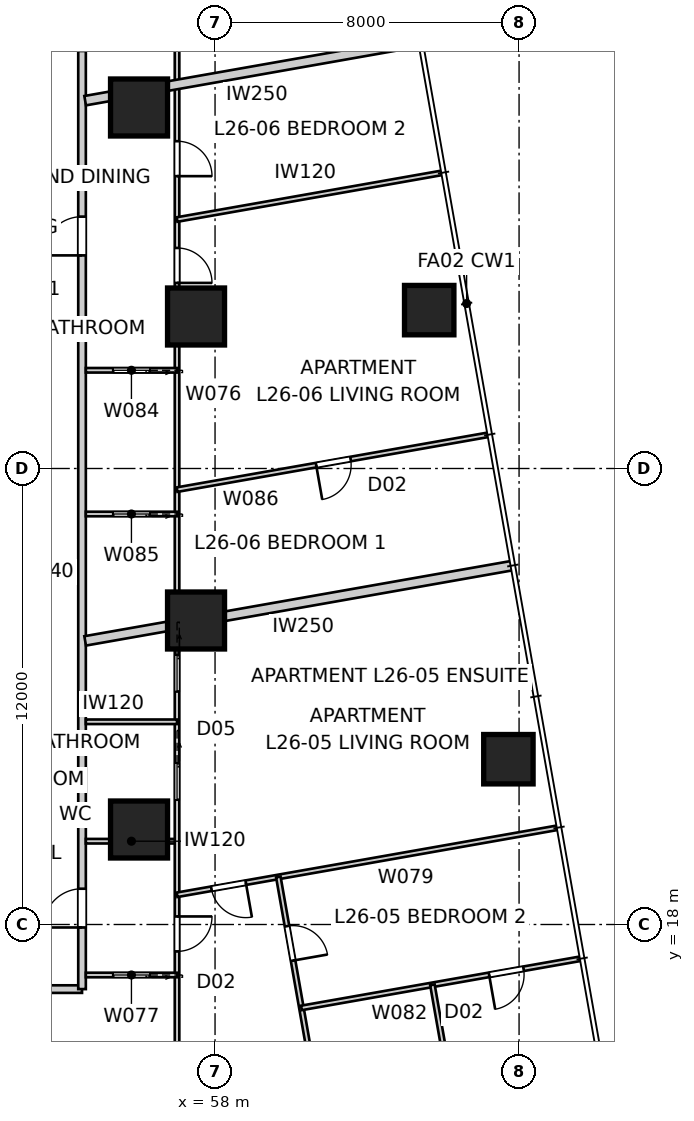
"""IFC4 building model, lengths in metres.
Left out: names, types, materials, properties, quantities, classifications, styles, units other than length and angle.
Written with IfcOpenShell. Run it as: python <this file> out.ifc"""

import sys

from ifc_helpers import new_model, si_unit, direction, frame, frame_2d, origin, origin_2d, place, context, subcontext, project, spatial, rectangle, extrude, element, fill, save


model = new_model("IFC4")
c1 = context("Model", 3, precision=1e-05, world=origin(), true_north=direction((0.0, 1.0)))
c2 = subcontext(c1, "Body", "Model", "MODEL_VIEW")
j1 = project(units=[si_unit("LENGTHUNIT", "METRE"), si_unit("PLANEANGLEUNIT", "RADIAN")], contexts=[c1])
p1 = place(None, origin())
s1 = spatial("IfcSite", under=j1, at=p1, CompositionType="ELEMENT")
p2 = place(p1, origin())
s2 = spatial("IfcBuilding", under=s1, at=p2, CompositionType="ELEMENT")
p3 = place(p2, frame((0.0, 0.0, 96.4)))
s3 = spatial("IfcBuildingStorey", under=s2, at=p3, CompositionType="ELEMENT", Elevation=96.4)
for number, where, z_axis, x_axis in (
    (1, (65.719, 22.35, 0.0), (0.0, 0.0, 1.0), (1.0, 0.0, 0.0)),
    (2, (63.635, 34.167, 0.0), (0.0, 0.0, 1.0), (1.0, 0.0, 0.0)),
):
    element("IfcColumn", number, at=place(p3, frame(where, z_axis=z_axis, x_axis=x_axis)), inside=s3, PredefinedType="COLUMN", context=c2, shape_type="SweptSolid", body=[
        extrude(rectangle(XDim=1.3, YDim=1.3, at=origin_2d()), origin(), (0.0, 0.0, 1.0), 3.4),
    ])
for number, where, z_axis, x_axis in (
    (3, (57.5, 26.0, 0.0), (0.0, 0.0, 1.0), (1.0, 0.0, 0.0)),
    (4, (57.5, 34.0, 0.0), (0.0, 0.0, 1.0), (1.0, 0.0, 0.0)),
    (5, (56.0, 39.5, 0.0), (0.0, 0.0, 1.0), (1.0, 0.0, 0.0)),
    (6, (56.0, 20.5, 0.0), (0.0, 0.0, 1.0), (1.0, 0.0, 0.0)),
):
    element("IfcColumn", number, at=place(p3, frame(where, z_axis=z_axis, x_axis=x_axis)), inside=s3, PredefinedType="COLUMN", context=c2, shape_type="SweptSolid", body=[
        extrude(rectangle(XDim=1.5, YDim=1.5, at=origin_2d()), origin(), (0.0, 0.0, 1.0), 3.4),
    ])
p4 = place(p3, frame((25.5, 16.3, 0.0), z_axis=(0.0, 0.0, 1.0), x_axis=(1.0, 0.0, 0.0)))
e7 = element("IfcWall", 7, at=p4, inside=s3, PredefinedType="PARTITIONING", context=c2, shape_type="SweptSolid", body=[
    extrude(rectangle(XDim=29.0, YDim=0.2, at=frame_2d((14.5, 0.0))), origin(), (0.0, 0.0, 1.0), 3.25),
])
p5 = place(p4, frame((20.896, 0.0, 0.0)))
e8 = element("IfcOpeningElement", 8, at=p5, cuts=e7, PredefinedType="OPENING", context=c2, shape_type="SweptSolid", body=[
    extrude(rectangle(XDim=1.02, YDim=2.34, at=frame_2d((0.51, 1.17))), frame((0.0, 0.11, 0.0), z_axis=(0.0, -1.0, 0.0), x_axis=(1.0, 0.0, 0.0)), (0.0, 0.0, 1.0), 0.22),
])
p6 = place(p4, frame((14.257, 0.0, 0.0)))
e9 = element("IfcOpeningElement", 9, at=p6, cuts=e7, PredefinedType="OPENING", context=c2, shape_type="SweptSolid", body=[
    extrude(rectangle(XDim=1.02, YDim=2.34, at=frame_2d((0.51, 1.17))), frame((0.0, 0.11, 0.0), z_axis=(0.0, -1.0, 0.0), x_axis=(1.0, 0.0, 0.0)), (0.0, 0.0, 1.0), 0.22),
])
p7 = place(p4, frame((3.857, 0.0, 0.0)))
e10 = element("IfcOpeningElement", 10, at=p7, cuts=e7, PredefinedType="OPENING", context=c2, shape_type="SweptSolid", body=[
    extrude(rectangle(XDim=1.02, YDim=2.34, at=frame_2d((0.51, 1.17))), frame((0.0, 0.11, 0.0), z_axis=(0.0, -1.0, 0.0), x_axis=(1.0, 0.0, 0.0)), (0.0, 0.0, 1.0), 0.22),
])
p8 = place(p3, frame((54.5, 16.3, 0.0), z_axis=(0.0, 0.0, 1.0), x_axis=(0.0, 1.0, 0.0)))
e11 = element("IfcWall", 11, at=p8, inside=s3, PredefinedType="PARTITIONING", context=c2, shape_type="SweptSolid", body=[
    extrude(rectangle(XDim=27.4, YDim=0.2, at=frame_2d((13.7, 0.0))), origin(), (0.0, 0.0, 1.0), 3.25),
])
p9 = place(p8, frame((19.308, 0.0, 0.0)))
e12 = element("IfcOpeningElement", 12, at=p9, cuts=e11, PredefinedType="OPENING", context=c2, shape_type="SweptSolid", body=[
    extrude(rectangle(XDim=1.02, YDim=2.34, at=frame_2d((0.51, 1.17))), frame((0.0, 0.11, 0.0), z_axis=(0.0, -1.0, 0.0), x_axis=(1.0, 0.0, 0.0)), (0.0, 0.0, 1.0), 0.22),
])
p10 = place(p8, frame((24.687, 0.0, 0.0)))
e13 = element("IfcOpeningElement", 13, at=p10, cuts=e11, PredefinedType="OPENING", context=c2, shape_type="SweptSolid", body=[
    extrude(rectangle(XDim=1.02, YDim=2.1, at=frame_2d((0.51, 1.05))), frame((0.0, 0.11, 0.0), z_axis=(0.0, -1.0, 0.0), x_axis=(1.0, 0.0, 0.0)), (0.0, 0.0, 1.0), 0.22),
])
p11 = place(p8, frame((1.622, 0.0, 0.0)))
e14 = element("IfcOpeningElement", 14, at=p11, cuts=e11, PredefinedType="OPENING", context=c2, shape_type="SweptSolid", body=[
    extrude(rectangle(XDim=1.02, YDim=2.1, at=frame_2d((0.51, 1.05))), frame((0.0, 0.11, 0.0), z_axis=(0.0, -1.0, 0.0), x_axis=(1.0, 0.0, 0.0)), (0.0, 0.0, 1.0), 0.22),
])
p12 = place(p3, frame((63.405, 41.235, 0.0), z_axis=(0.0, 0.0, 1.0), x_axis=(-0.984806596137, -0.173654738504, 0.0)))
e15 = element("IfcWall", 15, at=p12, inside=s3, PredefinedType="PARTITIONING", context=c2, shape_type="SweptSolid", body=[
    extrude(rectangle(XDim=8.958, YDim=0.25, at=frame_2d((4.479, 0.0))), origin(), (0.0, 0.0, 1.0), 3.25),
])
p13 = place(p3, frame((65.836, 27.448, 0.0), z_axis=(0.0, 0.0, 1.0), x_axis=(-0.98481000304, -0.173635416642, 0.0)))
e16 = element("IfcWall", 16, at=p13, inside=s3, PredefinedType="PARTITIONING", context=c2, shape_type="SweptSolid", body=[
    extrude(rectangle(XDim=11.427, YDim=0.25, at=frame_2d((5.713, 0.0))), origin(), (0.0, 0.0, 1.0), 3.25),
])
p14 = place(p3, frame((54.682, 7.203, 0.0), z_axis=(0.0, 0.0, 1.0), x_axis=(-0.173630137029, 0.984810933893, 0.0)))
e17 = element("IfcWall", 17, at=p14, inside=s3, PredefinedType="PARTITIONING", context=c2, shape_type="SweptSolid", body=[
    extrude(rectangle(XDim=9.154, YDim=0.25, at=frame_2d((4.577, 0.0))), origin(), (0.0, 0.0, 1.0), 3.25),
])
p15 = place(p3, frame((54.6, 20.192, 0.0), z_axis=(0.0, 0.0, 1.0), x_axis=(1.0, 0.0, 0.0)))
e18 = element("IfcWall", 18, at=p15, inside=s3, PredefinedType="PARTITIONING", context=c2, shape_type="SweptSolid", body=[
    extrude(rectangle(XDim=2.4, YDim=0.12, at=frame_2d((1.2, 0.0))), origin(), (0.0, 0.0, 1.0), 3.25),
])
p16 = place(p3, frame((57.0, 46.2, 0.0), z_axis=(0.0, 0.0, 1.0), x_axis=(0.0, -1.0, 0.0)))
e19 = element("IfcWall", 19, at=p16, inside=s3, PredefinedType="PARTITIONING", context=c2, shape_type="SweptSolid", body=[
    extrude(rectangle(XDim=32.4, YDim=0.12, at=frame_2d((16.2, 0.0))), origin(), (0.0, 0.0, 1.0), 2.55),
])
p17 = place(p16, frame((10.396, 0.0, 0.0)))
e20 = element("IfcOpeningElement", 20, at=p17, cuts=e19, PredefinedType="OPENING", context=c2, shape_type="SweptSolid", body=[
    extrude(rectangle(XDim=0.92, YDim=2.34, at=frame_2d((0.46, 1.17))), frame((0.0, 0.07, 0.0), z_axis=(0.0, -1.0, 0.0), x_axis=(1.0, 0.0, 0.0)), (0.0, 0.0, 1.0), 0.14),
])
p18 = place(p16, frame((7.587, 0.0, 0.0)))
e21 = element("IfcOpeningElement", 21, at=p18, cuts=e19, PredefinedType="OPENING", context=c2, shape_type="SweptSolid", body=[
    extrude(rectangle(XDim=0.92, YDim=2.34, at=frame_2d((0.46, 1.17))), frame((0.0, 0.07, 0.0), z_axis=(0.0, -1.0, 0.0), x_axis=(1.0, 0.0, 0.0)), (0.0, 0.0, 1.0), 0.14),
])
p19 = place(p16, frame((3.843, 0.0, 0.0)))
e22 = element("IfcOpeningElement", 22, at=p19, cuts=e19, PredefinedType="OPENING", context=c2, shape_type="SweptSolid", body=[
    extrude(rectangle(XDim=0.92, YDim=2.34, at=frame_2d((0.46, 1.17))), frame((0.0, 0.07, 0.0), z_axis=(0.0, -1.0, 0.0), x_axis=(1.0, 0.0, 0.0)), (0.0, 0.0, 1.0), 0.14),
])
p20 = place(p16, frame((27.988, 0.0, 0.0)))
e23 = element("IfcOpeningElement", 23, at=p20, cuts=e19, PredefinedType="OPENING", context=c2, shape_type="SweptSolid", body=[
    extrude(rectangle(XDim=0.92, YDim=2.34, at=frame_2d((0.46, 1.17))), frame((0.0, 0.07, 0.0), z_axis=(0.0, -1.0, 0.0), x_axis=(1.0, 0.0, 0.0)), (0.0, 0.0, 1.0), 0.14),
])
p21 = place(p16, frame((23.957, 0.0, 0.0)))
e24 = element("IfcOpeningElement", 24, at=p21, cuts=e19, PredefinedType="OPENING", context=c2, shape_type="SweptSolid", body=[
    extrude(rectangle(XDim=0.96, YDim=2.1, at=frame_2d((0.48, 1.05))), frame((0.0, 0.07, 0.0), z_axis=(0.0, -1.0, 0.0), x_axis=(1.0, 0.0, 0.0)), (0.0, 0.0, 1.0), 0.14),
])
p22 = place(p16, frame((21.108, 0.0, 0.0)))
e25 = element("IfcOpeningElement", 25, at=p22, cuts=e19, PredefinedType="OPENING", context=c2, shape_type="SweptSolid", body=[
    extrude(rectangle(XDim=0.96, YDim=2.1, at=frame_2d((0.48, 1.05))), frame((0.0, 0.07, 0.0), z_axis=(0.0, -1.0, 0.0), x_axis=(1.0, 0.0, 0.0)), (0.0, 0.0, 1.0), 0.14),
])
p23 = place(p3, frame((57.0, 16.671, 0.0), z_axis=(0.0, 0.0, 1.0), x_axis=(-1.0, 0.0, 0.0)))
e26 = element("IfcWall", 26, at=p23, inside=s3, PredefinedType="PARTITIONING", context=c2, shape_type="SweptSolid", body=[
    extrude(rectangle(XDim=2.4, YDim=0.12, at=frame_2d((1.2, 0.0))), origin(), (0.0, 0.0, 1.0), 3.25),
])
p24 = place(p23, frame((0.72, 0.0, 0.0)))
e27 = element("IfcOpeningElement", 27, at=p24, cuts=e26, PredefinedType="OPENING", context=c2, shape_type="SweptSolid", body=[
    extrude(rectangle(XDim=0.96, YDim=2.1, at=frame_2d((0.48, 1.05))), frame((0.0, 0.07, 0.0), z_axis=(0.0, -1.0, 0.0), x_axis=(1.0, 0.0, 0.0)), (0.0, 0.0, 1.0), 0.14),
])
p25 = place(p3, frame((54.6, 23.335, 0.0), z_axis=(0.0, 0.0, 1.0), x_axis=(1.0, 0.0, 0.0)))
e28 = element("IfcWall", 28, at=p25, inside=s3, PredefinedType="PARTITIONING", context=c2, shape_type="SweptSolid", body=[
    extrude(rectangle(XDim=2.4, YDim=0.12, at=frame_2d((1.2, 0.0))), origin(), (0.0, 0.0, 1.0), 3.25),
])
p26 = place(p3, frame((67.012, 20.547, 0.0), z_axis=(0.0, 0.0, 1.0), x_axis=(-0.984807724889, -0.173648337162, 0.0)))
e29 = element("IfcWall", 29, at=p26, inside=s3, PredefinedType="PARTITIONING", context=c2, shape_type="SweptSolid", body=[
    extrude(rectangle(XDim=10.167, YDim=0.12, at=frame_2d((5.083, 0.0))), origin(), (0.0, 0.0, 1.0), 2.638),
])
p27 = place(p26, frame((8.328, 0.0, 0.0)))
e30 = element("IfcOpeningElement", 30, at=p27, cuts=e29, PredefinedType="OPENING", context=c2, shape_type="SweptSolid", body=[
    extrude(rectangle(XDim=0.92, YDim=2.34, at=frame_2d((0.46, 1.17))), frame((0.0, 0.07, 0.0), z_axis=(0.0, -1.0, 0.0), x_axis=(1.0, 0.0, 0.0)), (0.0, 0.0, 1.0), 0.14),
])
p28 = place(p3, frame((59.665, 19.251, 0.0), z_axis=(0.0, 0.0, 1.0), x_axis=(0.173639194339, -0.984809336973, 0.0)))
e31 = element("IfcWall", 31, at=p28, inside=s3, PredefinedType="PARTITIONING", context=c2, shape_type="SweptSolid", body=[
    extrude(rectangle(XDim=10.96, YDim=0.12, at=frame_2d((5.48, 0.0))), origin(), (0.0, 0.0, 1.0), 3.25),
])
p29 = place(p28, frame((6.765, 0.0, 0.0)))
e32 = element("IfcOpeningElement", 32, at=p29, cuts=e31, PredefinedType="OPENING", context=c2, shape_type="SweptSolid", body=[
    extrude(rectangle(XDim=0.92, YDim=2.34, at=frame_2d((0.46, 1.17))), frame((0.0, 0.07, 0.0), z_axis=(0.0, -1.0, 0.0), x_axis=(1.0, 0.0, 0.0)), (0.0, 0.0, 1.0), 0.14),
])
p30 = place(p28, frame((1.315, 0.0, 0.0)))
e33 = element("IfcOpeningElement", 33, at=p30, cuts=e31, PredefinedType="OPENING", context=c2, shape_type="SweptSolid", body=[
    extrude(rectangle(XDim=0.92, YDim=2.34, at=frame_2d((0.46, 1.17))), frame((0.0, 0.07, 0.0), z_axis=(0.0, -1.0, 0.0), x_axis=(1.0, 0.0, 0.0)), (0.0, 0.0, 1.0), 0.14),
])
p31 = place(p3, frame((67.62, 17.1, 0.0), z_axis=(0.0, 0.0, 1.0), x_axis=(-0.984807929323, -0.173647177755, 0.0)))
e34 = element("IfcWall", 34, at=p31, inside=s3, PredefinedType="PARTITIONING", context=c2, shape_type="SweptSolid", body=[
    extrude(rectangle(XDim=7.46, YDim=0.12, at=frame_2d((3.73, 0.0))), origin(), (0.0, 0.0, 1.0), 3.25),
])
p32 = place(p31, frame((1.525, 0.0, 0.0)))
e35 = element("IfcOpeningElement", 35, at=p32, cuts=e34, PredefinedType="OPENING", context=c2, shape_type="SweptSolid", body=[
    extrude(rectangle(XDim=0.92, YDim=2.34, at=frame_2d((0.46, 1.17))), frame((0.0, 0.07, 0.0), z_axis=(0.0, -1.0, 0.0), x_axis=(1.0, 0.0, 0.0)), (0.0, 0.0, 1.0), 0.14),
])
p33 = place(p3, frame((63.72, 16.412, 0.0), z_axis=(0.0, 0.0, 1.0), x_axis=(0.173660541335, -0.984805572884, 0.0)))
e36 = element("IfcWall", 36, at=p33, inside=s3, PredefinedType="PARTITIONING", context=c2, shape_type="SweptSolid", body=[
    extrude(rectangle(XDim=3.46, YDim=0.12, at=frame_2d((1.73, 0.0))), origin(), (0.0, 0.0, 1.0), 3.25),
])
p34 = place(p3, frame((57.0, 32.585, 0.0), z_axis=(0.0, 0.0, 1.0), x_axis=(-1.0, 0.0, 0.0)))
e37 = element("IfcWall", 37, at=p34, inside=s3, PredefinedType="PARTITIONING", context=c2, shape_type="SweptSolid", body=[
    extrude(rectangle(XDim=2.4, YDim=0.12, at=frame_2d((1.2, 0.0))), origin(), (0.0, 0.0, 1.0), 3.25),
])
p35 = place(p34, frame((0.72, 0.0, 0.0)))
e38 = element("IfcOpeningElement", 38, at=p35, cuts=e37, PredefinedType="OPENING", context=c2, shape_type="SweptSolid", body=[
    extrude(rectangle(XDim=0.96, YDim=2.1, at=frame_2d((0.48, 1.05))), frame((0.0, 0.07, 0.0), z_axis=(0.0, -1.0, 0.0), x_axis=(1.0, 0.0, 0.0)), (0.0, 0.0, 1.0), 0.14),
])
p36 = place(p3, frame((57.0, 28.802, 0.0), z_axis=(0.0, 0.0, 1.0), x_axis=(-1.0, 0.0, 0.0)))
e39 = element("IfcWall", 39, at=p36, inside=s3, PredefinedType="PARTITIONING", context=c2, shape_type="SweptSolid", body=[
    extrude(rectangle(XDim=2.4, YDim=0.12, at=frame_2d((1.2, 0.0))), origin(), (0.0, 0.0, 1.0), 3.25),
])
p37 = place(p36, frame((0.72, 0.0, 0.0)))
e40 = element("IfcOpeningElement", 40, at=p37, cuts=e39, PredefinedType="OPENING", context=c2, shape_type="SweptSolid", body=[
    extrude(rectangle(XDim=0.96, YDim=2.1, at=frame_2d((0.48, 1.05))), frame((0.0, 0.07, 0.0), z_axis=(0.0, -1.0, 0.0), x_axis=(1.0, 0.0, 0.0)), (0.0, 0.0, 1.0), 0.14),
])
p38 = place(p3, frame((65.188, 30.887, 0.0), z_axis=(0.0, 0.0, 1.0), x_axis=(-0.984807787824, -0.173647980238, 0.0)))
e41 = element("IfcWall", 41, at=p38, inside=s3, PredefinedType="PARTITIONING", context=c2, shape_type="SweptSolid", body=[
    extrude(rectangle(XDim=8.315, YDim=0.12, at=frame_2d((4.157, 0.0))), origin(), (0.0, 0.0, 1.0), 3.25),
])
p39 = place(p38, frame((3.677, 0.0, 0.0)))
e42 = element("IfcOpeningElement", 42, at=p39, cuts=e41, PredefinedType="OPENING", context=c2, shape_type="SweptSolid", body=[
    extrude(rectangle(XDim=0.92, YDim=2.34, at=frame_2d((0.46, 1.17))), frame((0.0, 0.07, 0.0), z_axis=(0.0, -1.0, 0.0), x_axis=(1.0, 0.0, 0.0)), (0.0, 0.0, 1.0), 0.14),
])
p40 = place(p3, frame((57.0, 36.552, 0.0), z_axis=(0.0, 0.0, 1.0), x_axis=(0.984809234282, 0.173639776761, 0.0)))
e43 = element("IfcWall", 43, at=p40, inside=s3, PredefinedType="PARTITIONING", context=c2, shape_type="SweptSolid", body=[
    extrude(rectangle(XDim=7.081, YDim=0.12, at=frame_2d((3.541, 0.0))), origin(), (0.0, 0.0, 1.0), 3.25),
])
p41 = place(p9, origin())
e44 = element("IfcDoor", 44, at=p41, inside=s3, OperationType="SINGLE_SWING_LEFT", PredefinedType="DOOR", context=c2, shape_type="SweptSolid", body=[
    extrude(rectangle(XDim=1.02, YDim=2.34, at=frame_2d((0.51, 1.17))), frame((0.0, 0.025, 0.0), z_axis=(0.0, -1.0, 0.0), x_axis=(1.0, 0.0, 0.0)), (0.0, 0.0, 1.0), 0.05),
])
fill(e12, e44)
p42 = place(p11, origin())
e45 = element("IfcDoor", 45, at=p42, inside=s3, OperationType="SINGLE_SWING_LEFT", PredefinedType="DOOR", context=c2, shape_type="SweptSolid", body=[
    extrude(rectangle(XDim=1.02, YDim=2.1, at=frame_2d((0.51, 1.05))), frame((0.0, 0.025, 0.0), z_axis=(0.0, -1.0, 0.0), x_axis=(1.0, 0.0, 0.0)), (0.0, 0.0, 1.0), 0.05),
])
fill(e14, e45)
p43 = place(p17, origin())
e46 = element("IfcDoor", 46, at=p43, inside=s3, OperationType="SINGLE_SWING_RIGHT", PredefinedType="DOOR", context=c2, shape_type="SweptSolid", body=[
    extrude(rectangle(XDim=0.92, YDim=2.34, at=frame_2d((0.46, 1.17))), frame((0.0, 0.025, 0.0), z_axis=(0.0, -1.0, 0.0), x_axis=(1.0, 0.0, 0.0)), (0.0, 0.0, 1.0), 0.05),
])
fill(e20, e46)
p44 = place(p18, origin())
e47 = element("IfcDoor", 47, at=p44, inside=s3, OperationType="SINGLE_SWING_RIGHT", PredefinedType="DOOR", context=c2, shape_type="SweptSolid", body=[
    extrude(rectangle(XDim=0.92, YDim=2.34, at=frame_2d((0.46, 1.17))), frame((0.0, 0.025, 0.0), z_axis=(0.0, -1.0, 0.0), x_axis=(1.0, 0.0, 0.0)), (0.0, 0.0, 1.0), 0.05),
])
fill(e21, e47)
p45 = place(p35, origin())
e48 = element("IfcDoor", 48, at=p45, inside=s3, OperationType="SLIDING_TO_LEFT", PredefinedType="DOOR", context=c2, shape_type="SweptSolid", body=[
    extrude(rectangle(XDim=0.96, YDim=2.1, at=frame_2d((0.48, 1.05))), frame((0.0, 0.025, 0.0), z_axis=(0.0, -1.0, 0.0), x_axis=(1.0, 0.0, 0.0)), (0.0, 0.0, 1.0), 0.05),
])
fill(e38, e48)
p46 = place(p24, origin())
e49 = element("IfcDoor", 49, at=p46, inside=s3, OperationType="SLIDING_TO_LEFT", PredefinedType="DOOR", context=c2, shape_type="SweptSolid", body=[
    extrude(rectangle(XDim=0.96, YDim=2.1, at=frame_2d((0.48, 1.05))), frame((0.0, 0.025, 0.0), z_axis=(0.0, -1.0, 0.0), x_axis=(1.0, 0.0, 0.0)), (0.0, 0.0, 1.0), 0.05),
])
fill(e27, e49)
p47 = place(p20, origin())
e50 = element("IfcDoor", 50, at=p47, inside=s3, OperationType="SINGLE_SWING_LEFT", PredefinedType="DOOR", context=c2, shape_type="SweptSolid", body=[
    extrude(rectangle(XDim=0.92, YDim=2.34, at=frame_2d((0.46, 1.17))), frame((0.0, 0.025, 0.0), z_axis=(0.0, -1.0, 0.0), x_axis=(1.0, 0.0, 0.0)), (0.0, 0.0, 1.0), 0.05),
])
fill(e23, e50)
p48 = place(p39, origin())
e51 = element("IfcDoor", 51, at=p48, inside=s3, OperationType="SINGLE_SWING_RIGHT", PredefinedType="DOOR", context=c2, shape_type="SweptSolid", body=[
    extrude(rectangle(XDim=0.92, YDim=2.34, at=frame_2d((0.46, 1.17))), frame((0.0, 0.025, 0.0), z_axis=(0.0, -1.0, 0.0), x_axis=(1.0, 0.0, 0.0)), (0.0, 0.0, 1.0), 0.05),
])
fill(e42, e51)
p49 = place(p37, origin())
e52 = element("IfcDoor", 52, at=p49, inside=s3, OperationType="SLIDING_TO_LEFT", PredefinedType="DOOR", context=c2, shape_type="SweptSolid", body=[
    extrude(rectangle(XDim=0.96, YDim=2.1, at=frame_2d((0.48, 1.05))), frame((0.0, 0.025, 0.0), z_axis=(0.0, -1.0, 0.0), x_axis=(1.0, 0.0, 0.0)), (0.0, 0.0, 1.0), 0.05),
])
fill(e40, e52)
p50 = place(p30, origin())
e53 = element("IfcDoor", 53, at=p50, inside=s3, OperationType="SINGLE_SWING_RIGHT", PredefinedType="DOOR", context=c2, shape_type="SweptSolid", body=[
    extrude(rectangle(XDim=0.92, YDim=2.34, at=frame_2d((0.46, 1.17))), frame((0.0, 0.025, 0.0), z_axis=(0.0, -1.0, 0.0), x_axis=(1.0, 0.0, 0.0)), (0.0, 0.0, 1.0), 0.05),
])
fill(e33, e53)
p51 = place(p27, origin())
e54 = element("IfcDoor", 54, at=p51, inside=s3, OperationType="SINGLE_SWING_LEFT", PredefinedType="DOOR", context=c2, shape_type="SweptSolid", body=[
    extrude(rectangle(XDim=0.92, YDim=2.34, at=frame_2d((0.46, 1.17))), frame((0.0, 0.025, 0.0), z_axis=(0.0, -1.0, 0.0), x_axis=(1.0, 0.0, 0.0)), (0.0, 0.0, 1.0), 0.05),
])
fill(e30, e54)
p52 = place(p21, origin())
e55 = element("IfcDoor", 55, at=p52, inside=s3, OperationType="SLIDING_TO_LEFT", PredefinedType="DOOR", context=c2, shape_type="SweptSolid", body=[
    extrude(rectangle(XDim=0.96, YDim=2.1, at=frame_2d((0.48, 1.05))), frame((0.0, 0.025, 0.0), z_axis=(0.0, -1.0, 0.0), x_axis=(1.0, 0.0, 0.0)), (0.0, 0.0, 1.0), 0.05),
])
fill(e24, e55)
p53 = place(p22, origin())
e56 = element("IfcDoor", 56, at=p53, inside=s3, OperationType="SLIDING_TO_LEFT", PredefinedType="DOOR", context=c2, shape_type="SweptSolid", body=[
    extrude(rectangle(XDim=0.96, YDim=2.1, at=frame_2d((0.48, 1.05))), frame((0.0, 0.025, 0.0), z_axis=(0.0, -1.0, 0.0), x_axis=(1.0, 0.0, 0.0)), (0.0, 0.0, 1.0), 0.05),
])
fill(e25, e56)
p54 = place(p32, origin())
e57 = element("IfcDoor", 57, at=p54, inside=s3, OperationType="SINGLE_SWING_RIGHT", PredefinedType="DOOR", context=c2, shape_type="SweptSolid", body=[
    extrude(rectangle(XDim=0.92, YDim=2.34, at=frame_2d((0.46, 1.17))), frame((0.0, 0.025, 0.0), z_axis=(0.0, -1.0, 0.0), x_axis=(1.0, 0.0, 0.0)), (0.0, 0.0, 1.0), 0.05),
])
fill(e35, e57)
save(model, sys.argv[1])
